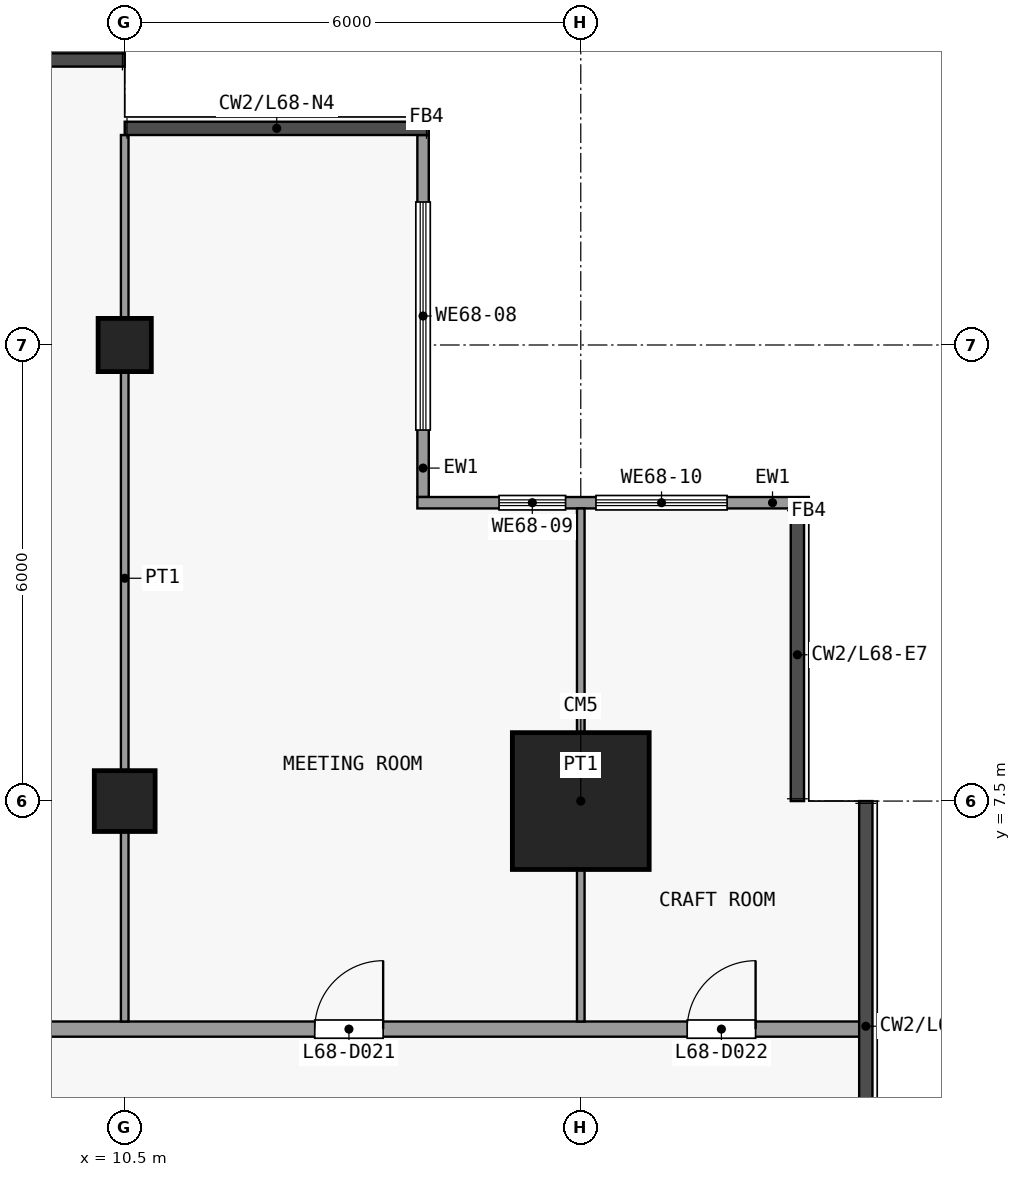
"""IFC4 building model, lengths in metres.
Left out: names, types, materials, properties, quantities, classifications, styles, units other than length and angle.
Written with IfcOpenShell. Run it as: python <this file> out.ifc"""

import sys

from ifc_helpers import new_model, si_unit, direction, frame, frame_2d, origin, origin_2d, place, context, subcontext, project, spatial, rectangle, extrude, element, fill, save


model = new_model("IFC4")
c1 = context("Model", 3, precision=1e-05, world=origin(), true_north=direction((0.0, 1.0)))
c2 = subcontext(c1, "Body", "Model", "MODEL_VIEW")
j1 = project(units=[si_unit("LENGTHUNIT", "METRE"), si_unit("PLANEANGLEUNIT", "RADIAN")], contexts=[c1])
p1 = place(None, origin())
s1 = spatial("IfcSite", under=j1, at=p1, CompositionType="ELEMENT")
p2 = place(p1, origin())
s2 = spatial("IfcBuilding", under=s1, at=p2, CompositionType="ELEMENT")
p3 = place(p2, frame((0.0, 0.0, 269.9)))
s3 = spatial("IfcBuildingStorey", under=s2, at=p3, CompositionType="ELEMENT", Elevation=269.9)
p4 = place(p3, frame((10.5, 7.5, 0.0), z_axis=(0.0, 0.0, 1.0), x_axis=(1.0, 0.0, 0.0)))
e1 = element("IfcColumn", 1, at=p4, inside=s3, PredefinedType="COLUMN", context=c2, shape_type="SweptSolid", body=[
    extrude(rectangle(XDim=0.8, YDim=0.8, at=origin_2d()), origin(), (0.0, 0.0, 1.0), 3.6),
])
p5 = place(p3, frame((10.5, 13.5, 0.0), z_axis=(0.0, 0.0, 1.0), x_axis=(1.0, 0.0, 0.0)))
e2 = element("IfcColumn", 2, at=p5, inside=s3, PredefinedType="COLUMN", context=c2, shape_type="SweptSolid", body=[
    extrude(rectangle(XDim=0.7, YDim=0.7, at=origin_2d()), origin(), (0.0, 0.0, 1.0), 3.6),
])
p6 = place(p3, frame((16.5, 7.5, 0.0), z_axis=(0.0, 0.0, 1.0), x_axis=(1.0, 0.0, 0.0)))
e3 = element("IfcColumn", 3, at=p6, inside=s3, PredefinedType="COLUMN", context=c2, shape_type="SweptSolid", body=[
    extrude(rectangle(XDim=1.8, YDim=1.8, at=origin_2d()), origin(), (0.0, 0.0, 1.0), 3.6),
])
p7 = place(p3, frame((14.425, 16.262, 0.0), z_axis=(0.0, 0.0, 1.0), x_axis=(0.0, -1.0, 0.0)))
e4 = element("IfcWall", 4, at=p7, inside=s3, PredefinedType="SOLIDWALL", context=c2, shape_type="SweptSolid", body=[
    extrude(rectangle(XDim=4.762, YDim=0.15, at=frame_2d((2.381, 0.0))), origin(), (0.0, 0.0, 1.0), 3.3),
])
p8 = place(p7, frame((0.881, 0.0, 0.9)))
e5 = element("IfcOpeningElement", 5, at=p8, cuts=e4, PredefinedType="OPENING", context=c2, shape_type="SweptSolid", body=[
    extrude(rectangle(XDim=3.0, YDim=2.4, at=frame_2d((1.5, 1.2))), frame((0.0, 0.085, 0.0), z_axis=(0.0, -1.0, 0.0), x_axis=(1.0, 0.0, 0.0)), (0.0, 0.0, 1.0), 0.17),
])
p9 = place(p3, frame((14.35, 11.425, 0.0), z_axis=(0.0, 0.0, 1.0), x_axis=(1.0, 0.0, 0.0)))
e6 = element("IfcWall", 6, at=p9, inside=s3, PredefinedType="SOLIDWALL", context=c2, shape_type="SweptSolid", body=[
    extrude(rectangle(XDim=5.15, YDim=0.15, at=frame_2d((2.575, 0.0))), origin(), (0.0, 0.0, 1.0), 3.3),
])
p10 = place(p9, frame((1.075, 0.0, 0.9)))
e7 = element("IfcOpeningElement", 7, at=p10, cuts=e6, PredefinedType="OPENING", context=c2, shape_type="SweptSolid", body=[
    extrude(rectangle(XDim=0.875, YDim=2.4, at=frame_2d((0.438, 1.2))), frame((0.0, 0.085, 0.0), z_axis=(0.0, -1.0, 0.0), x_axis=(1.0, 0.0, 0.0)), (0.0, 0.0, 1.0), 0.17),
])
p11 = place(p9, frame((2.35, 0.0, 0.9)))
e8 = element("IfcOpeningElement", 8, at=p11, cuts=e6, PredefinedType="OPENING", context=c2, shape_type="SweptSolid", body=[
    extrude(rectangle(XDim=1.725, YDim=2.4, at=frame_2d((0.863, 1.2))), frame((0.0, 0.085, 0.0), z_axis=(0.0, -1.0, 0.0), x_axis=(1.0, 0.0, 0.0)), (0.0, 0.0, 1.0), 0.17),
])
p12 = place(p3, frame((-19.35, 4.5, 0.0), z_axis=(0.0, 0.0, 1.0), x_axis=(1.0, 0.0, 0.0)))
e9 = element("IfcWall", 9, at=p12, inside=s3, PredefinedType="PARTITIONING", context=c2, shape_type="SweptSolid", body=[
    extrude(rectangle(XDim=39.6, YDim=0.2, at=frame_2d((19.8, 0.0))), origin(), (0.0, 0.0, 1.0), 3.3),
])
p13 = place(p12, frame((1.0, 0.0, 0.0)))
e10 = element("IfcOpeningElement", 10, at=p13, cuts=e9, PredefinedType="OPENING", context=c2, shape_type="SweptSolid", body=[
    extrude(rectangle(XDim=0.9, YDim=2.1, at=frame_2d((0.45, 1.05))), frame((0.0, 0.11, 0.0), z_axis=(0.0, -1.0, 0.0), x_axis=(1.0, 0.0, 0.0)), (0.0, 0.0, 1.0), 0.22),
])
p14 = place(p12, frame((5.35, 0.0, 0.0)))
e11 = element("IfcOpeningElement", 11, at=p14, cuts=e9, PredefinedType="OPENING", context=c2, shape_type="SweptSolid", body=[
    extrude(rectangle(XDim=0.9, YDim=2.1, at=frame_2d((0.45, 1.05))), frame((0.0, 0.11, 0.0), z_axis=(0.0, -1.0, 0.0), x_axis=(1.0, 0.0, 0.0)), (0.0, 0.0, 1.0), 0.22),
])
p15 = place(p12, frame((11.35, 0.0, 0.0)))
e12 = element("IfcOpeningElement", 12, at=p15, cuts=e9, PredefinedType="OPENING", context=c2, shape_type="SweptSolid", body=[
    extrude(rectangle(XDim=0.9, YDim=2.1, at=frame_2d((0.45, 1.05))), frame((0.0, 0.11, 0.0), z_axis=(0.0, -1.0, 0.0), x_axis=(1.0, 0.0, 0.0)), (0.0, 0.0, 1.0), 0.22),
])
p16 = place(p12, frame((18.85, 0.0, 0.0)))
e13 = element("IfcOpeningElement", 13, at=p16, cuts=e9, PredefinedType="OPENING", context=c2, shape_type="SweptSolid", body=[
    extrude(rectangle(XDim=0.9, YDim=2.1, at=frame_2d((0.45, 1.05))), frame((0.0, 0.11, 0.0), z_axis=(0.0, -1.0, 0.0), x_axis=(1.0, 0.0, 0.0)), (0.0, 0.0, 1.0), 0.22),
])
p17 = place(p12, frame((26.35, 0.0, 0.0)))
e14 = element("IfcOpeningElement", 14, at=p17, cuts=e9, PredefinedType="OPENING", context=c2, shape_type="SweptSolid", body=[
    extrude(rectangle(XDim=0.9, YDim=2.1, at=frame_2d((0.45, 1.05))), frame((0.0, 0.11, 0.0), z_axis=(0.0, -1.0, 0.0), x_axis=(1.0, 0.0, 0.0)), (0.0, 0.0, 1.0), 0.22),
])
p18 = place(p12, frame((32.35, 0.0, 0.0)))
e15 = element("IfcOpeningElement", 15, at=p18, cuts=e9, PredefinedType="OPENING", context=c2, shape_type="SweptSolid", body=[
    extrude(rectangle(XDim=0.9, YDim=2.1, at=frame_2d((0.45, 1.05))), frame((0.0, 0.11, 0.0), z_axis=(0.0, -1.0, 0.0), x_axis=(1.0, 0.0, 0.0)), (0.0, 0.0, 1.0), 0.22),
])
p19 = place(p12, frame((37.25, 0.0, 0.0)))
e16 = element("IfcOpeningElement", 16, at=p19, cuts=e9, PredefinedType="OPENING", context=c2, shape_type="SweptSolid", body=[
    extrude(rectangle(XDim=0.9, YDim=2.1, at=frame_2d((0.45, 1.05))), frame((0.0, 0.11, 0.0), z_axis=(0.0, -1.0, 0.0), x_axis=(1.0, 0.0, 0.0)), (0.0, 0.0, 1.0), 0.22),
])
p20 = place(p3, frame((10.5, 4.6, 0.0), z_axis=(0.0, 0.0, 1.0), x_axis=(0.0, 1.0, 0.0)))
e17 = element("IfcWall", 17, at=p20, inside=s3, PredefinedType="PARTITIONING", context=c2, shape_type="SweptSolid", body=[
    extrude(rectangle(XDim=11.662, YDim=0.1, at=frame_2d((5.831, 0.0))), origin(), (0.0, 0.0, 1.0), 3.3),
])
p21 = place(p3, frame((16.5, 4.6, 0.0), z_axis=(0.0, 0.0, 1.0), x_axis=(0.0, 1.0, 0.0)))
e18 = element("IfcWall", 18, at=p21, inside=s3, PredefinedType="PARTITIONING", context=c2, shape_type="SweptSolid", body=[
    extrude(rectangle(XDim=6.75, YDim=0.1, at=frame_2d((3.375, 0.0))), origin(), (0.0, 0.0, 1.0), 3.3),
])
p22 = place(p8, origin())
e19 = element("IfcWindow", 19, at=p22, inside=s3, PartitioningType="SINGLE_PANEL", PredefinedType="WINDOW", context=c2, shape_type="SweptSolid", body=[
    extrude(rectangle(XDim=3.0, YDim=2.4, at=frame_2d((1.5, 1.2))), frame((0.0, 0.03, 0.0), z_axis=(0.0, -1.0, 0.0), x_axis=(1.0, 0.0, 0.0)), (0.0, 0.0, 1.0), 0.06),
])
fill(e5, e19)
p23 = place(p10, origin())
e20 = element("IfcWindow", 20, at=p23, inside=s3, PartitioningType="SINGLE_PANEL", PredefinedType="WINDOW", context=c2, shape_type="SweptSolid", body=[
    extrude(rectangle(XDim=0.875, YDim=2.4, at=frame_2d((0.438, 1.2))), frame((0.0, 0.03, 0.0), z_axis=(0.0, -1.0, 0.0), x_axis=(1.0, 0.0, 0.0)), (0.0, 0.0, 1.0), 0.06),
])
fill(e7, e20)
p24 = place(p11, origin())
e21 = element("IfcWindow", 21, at=p24, inside=s3, PartitioningType="SINGLE_PANEL", PredefinedType="WINDOW", context=c2, shape_type="SweptSolid", body=[
    extrude(rectangle(XDim=1.725, YDim=2.4, at=frame_2d((0.863, 1.2))), frame((0.0, 0.03, 0.0), z_axis=(0.0, -1.0, 0.0), x_axis=(1.0, 0.0, 0.0)), (0.0, 0.0, 1.0), 0.06),
])
fill(e8, e21)
p25 = place(p18, origin())
e22 = element("IfcDoor", 22, at=p25, inside=s3, OperationType="SINGLE_SWING_LEFT", PredefinedType="DOOR", context=c2, shape_type="SweptSolid", body=[
    extrude(rectangle(XDim=0.9, YDim=2.1, at=frame_2d((0.45, 1.05))), frame((0.0, 0.025, 0.0), z_axis=(0.0, -1.0, 0.0), x_axis=(1.0, 0.0, 0.0)), (0.0, 0.0, 1.0), 0.05),
])
fill(e15, e22)
p26 = place(p19, origin())
e23 = element("IfcDoor", 23, at=p26, inside=s3, OperationType="SINGLE_SWING_LEFT", PredefinedType="DOOR", context=c2, shape_type="SweptSolid", body=[
    extrude(rectangle(XDim=0.9, YDim=2.1, at=frame_2d((0.45, 1.05))), frame((0.0, 0.025, 0.0), z_axis=(0.0, -1.0, 0.0), x_axis=(1.0, 0.0, 0.0)), (0.0, 0.0, 1.0), 0.05),
])
fill(e16, e23)
save(model, sys.argv[1])
